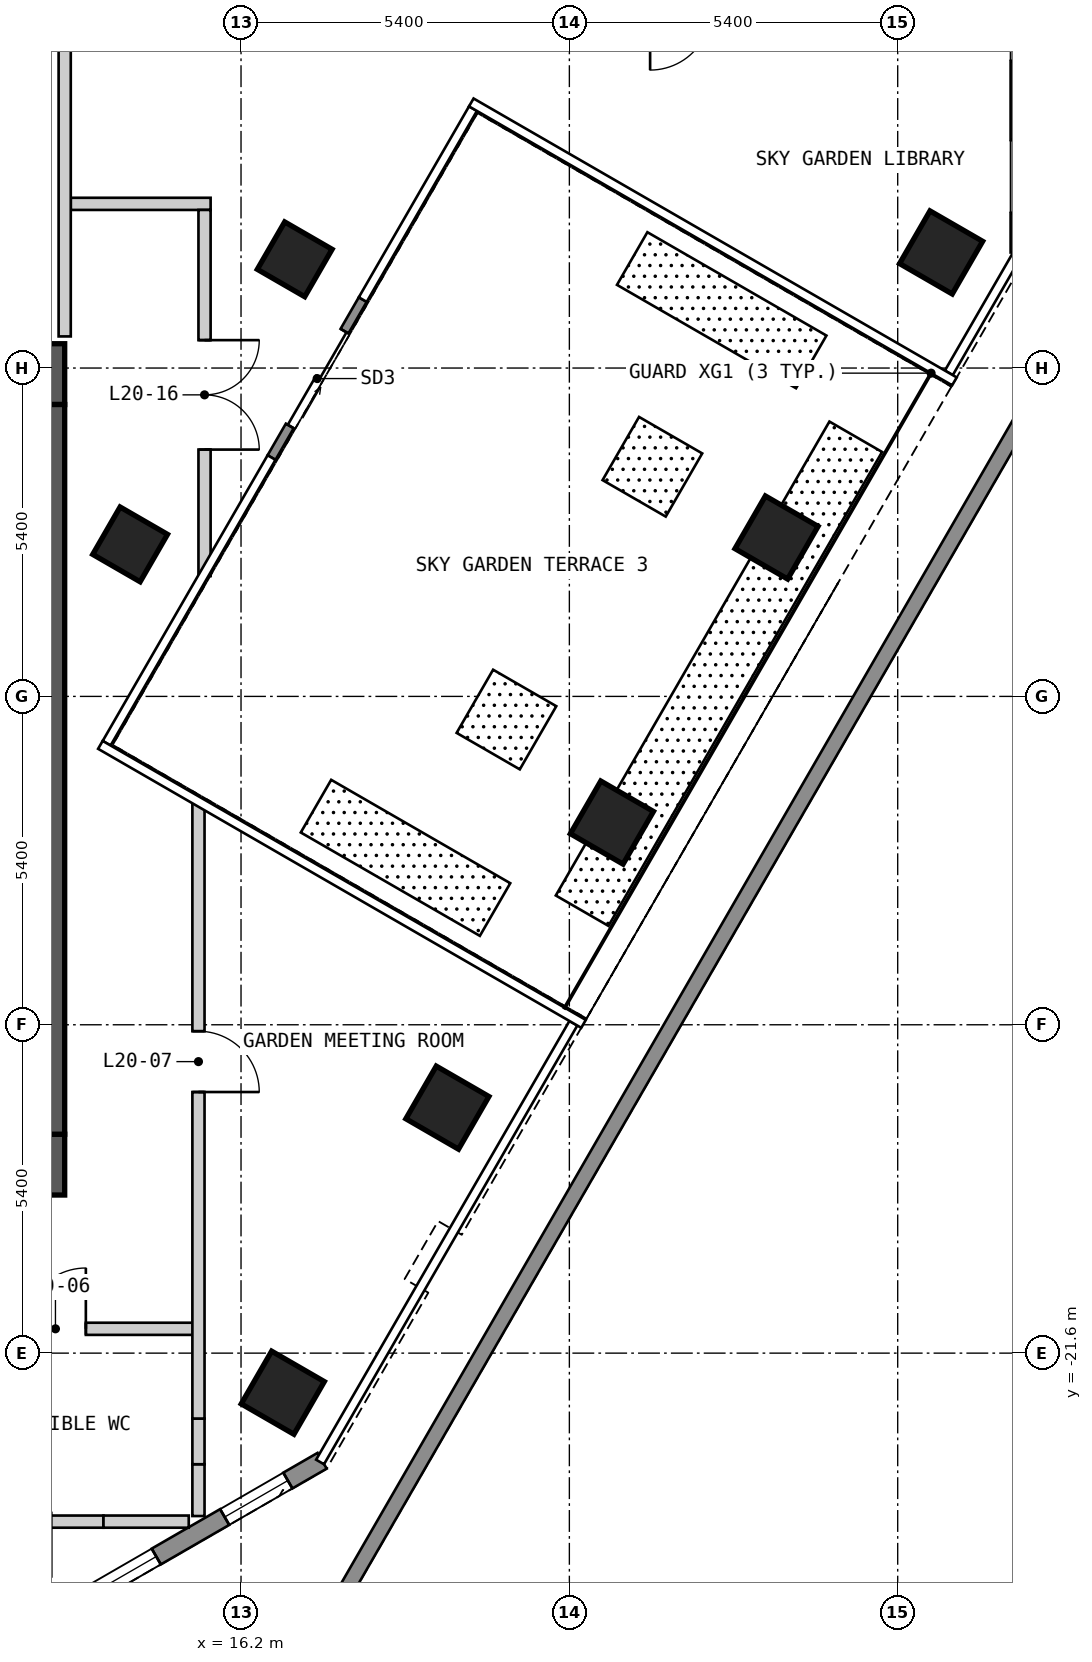
"""IFC4 building model, lengths in metres.
Left out: names, types, materials, properties, quantities, classifications, styles, units other than length and angle.
Written with IfcOpenShell. Run it as: python <this file> out.ifc"""

import sys

from ifc_helpers import new_model, si_unit, direction, frame, frame_2d, origin, origin_2d, place, context, subcontext, project, spatial, polyline, rectangle, outline, extrude, element, fill, save


model = new_model("IFC4")
c1 = context("Model", 3, precision=1e-05, world=origin(), true_north=direction((0.0, 1.0)))
c2 = subcontext(c1, "Body", "Model", "MODEL_VIEW")
j1 = project(units=[si_unit("LENGTHUNIT", "METRE"), si_unit("PLANEANGLEUNIT", "RADIAN")], contexts=[c1])
p1 = place(None, origin())
s1 = spatial("IfcSite", under=j1, at=p1, CompositionType="ELEMENT")
p2 = place(p1, origin())
s2 = spatial("IfcBuilding", under=s1, at=p2, CompositionType="ELEMENT")
p3 = place(p2, frame((0.0, 0.0, 66.0)))
s3 = spatial("IfcBuildingStorey", under=s2, at=p3, CompositionType="ELEMENT", Elevation=66.0)
for number, where, z_axis, x_axis in (
    (1, (16.887, -22.251, 0.0), (0.0, 0.0, 1.0), (0.5, 0.866, 0.0)),
    (2, (19.594, -17.563, 0.0), (0.0, 0.0, 1.0), (0.5, 0.866, 0.0)),
    (3, (22.3, -12.875, 0.0), (0.0, 0.0, 1.0), (0.5, 0.866, 0.0)),
    (4, (25.007, -8.187, 0.0), (0.0, 0.0, 1.0), (0.5, 0.866, 0.0)),
    (5, (27.714, -3.499, 0.0), (0.0, 0.0, 1.0), (0.5, 0.866, 0.0)),
):
    element("IfcColumn", number, at=place(p3, frame(where, z_axis=z_axis, x_axis=x_axis)), inside=s3, PredefinedType="COLUMN", context=c2, shape_type="SweptSolid", body=[
        extrude(rectangle(XDim=1.0, YDim=1.0, at=origin_2d()), origin(), (0.0, 0.0, 1.0), 6.0),
    ])
for number, where, z_axis, x_axis in (
    (6, (14.376, -8.3, 0.0), (0.0, 0.0, 1.0), (0.5, 0.866, 0.0)),
    (7, (17.083, -3.612, 0.0), (0.0, 0.0, 1.0), (0.5, 0.866, 0.0)),
):
    element("IfcColumn", number, at=place(p3, frame(where, z_axis=z_axis, x_axis=x_axis)), inside=s3, PredefinedType="COLUMN", context=c2, shape_type="SweptSolid", body=[
        extrude(rectangle(XDim=0.9, YDim=0.9, at=origin_2d()), origin(), (0.0, 0.0, 1.0), 6.0),
    ])
p4 = place(p3, frame((-13.3, -18.5, 0.0), z_axis=(0.0, 0.0, 1.0), x_axis=(1.0, 0.0, 0.0)))
e8 = element("IfcWall", 8, at=p4, inside=s3, PredefinedType="SHEAR", context=c2, shape_type="SweptSolid", body=[
    extrude(rectangle(XDim=26.6, YDim=1.0, at=frame_2d((13.3, 0.0))), origin(), (0.0, 0.0, 1.0), 5.7),
])
p5 = place(p3, frame((-13.3, -5.5, 0.0), z_axis=(0.0, 0.0, 1.0), x_axis=(1.0, 0.0, 0.0)))
e9 = element("IfcWall", 9, at=p5, inside=s3, PredefinedType="SHEAR", context=c2, shape_type="SweptSolid", body=[
    extrude(rectangle(XDim=26.6, YDim=1.0, at=frame_2d((13.3, 0.0))), origin(), (0.0, 0.0, 1.0), 5.7),
])
p6 = place(p5, frame((23.65, 0.0, 0.0)))
e10 = element("IfcOpeningElement", 10, at=p6, cuts=e9, PredefinedType="OPENING", context=c2, shape_type="SweptSolid", body=[
    extrude(rectangle(XDim=1.2, YDim=2.1, at=frame_2d((0.6, 1.05))), frame((0.0, 0.51, 0.0), z_axis=(0.0, -1.0, 0.0), x_axis=(1.0, 0.0, 0.0)), (0.0, 0.0, 1.0), 1.02),
])
p7 = place(p3, frame((12.8, -18.0, 0.0), z_axis=(0.0, 0.0, 1.0), x_axis=(0.0, 1.0, 0.0)))
e11 = element("IfcWall", 11, at=p7, inside=s3, PredefinedType="SHEAR", context=c2, shape_type="SweptSolid", body=[
    extrude(rectangle(XDim=12.0, YDim=1.0, at=frame_2d((6.0, 0.0))), origin(), (0.0, 0.0, 1.0), 5.7),
])
p8 = place(p3, frame((13.204, -25.87, 0.0), z_axis=(0.0, 0.0, 1.0), x_axis=(0.866010750942, 0.50002537861, 0.0)))
e12 = element("IfcWall", 12, at=p8, inside=s3, PredefinedType="SOLIDWALL", context=c2, shape_type="SweptSolid", body=[
    extrude(outline(polyline([(0.0, -0.15), (5.0, -0.15), (4.919, 0.15), (0.08, 0.15), (0.0, -0.15)])), origin(), (0.0, 0.0, 1.0), 5.7),
])
p9 = place(p8, frame((0.65, 0.0, 0.15)))
e13 = element("IfcOpeningElement", 13, at=p9, cuts=e12, PredefinedType="OPENING", context=c2, shape_type="SweptSolid", body=[
    extrude(rectangle(XDim=1.2, YDim=2.1, at=frame_2d((0.6, 1.05))), frame((0.0, 0.16, 0.0), z_axis=(0.0, -1.0, 0.0), x_axis=(1.0, 0.0, 0.0)), (0.0, 0.0, 1.0), 0.32),
])
p10 = place(p8, frame((3.149, 0.0, 0.15)))
e14 = element("IfcOpeningElement", 14, at=p10, cuts=e12, PredefinedType="OPENING", context=c2, shape_type="SweptSolid", body=[
    extrude(rectangle(XDim=1.2, YDim=2.1, at=frame_2d((0.6, 1.05))), frame((0.0, 0.16, 0.0), z_axis=(0.0, -1.0, 0.0), x_axis=(1.0, 0.0, 0.0)), (0.0, 0.0, 1.0), 0.32),
])
p11 = place(p3, frame((29.007, -3.5, 0.0), z_axis=(0.0, 0.0, 1.0), x_axis=(0.0, 1.0, 0.0)))
e15 = element("IfcWall", 15, at=p11, inside=s3, PredefinedType="SOLIDWALL", context=c2, shape_type="SweptSolid", body=[
    extrude(outline(polyline([(0.0, -0.15), (5.0, -0.15), (4.92, 0.15), (0.08, 0.15), (0.0, -0.15)])), origin(), (0.0, 0.0, 1.0), 5.7),
])
p12 = place(p11, frame((0.65, 0.0, 0.15)))
e16 = element("IfcOpeningElement", 16, at=p12, cuts=e15, PredefinedType="OPENING", context=c2, shape_type="SweptSolid", body=[
    extrude(rectangle(XDim=1.2, YDim=2.1, at=frame_2d((0.6, 1.05))), frame((0.0, 0.16, 0.0), z_axis=(0.0, -1.0, 0.0), x_axis=(1.0, 0.0, 0.0)), (0.0, 0.0, 1.0), 0.32),
])
p13 = place(p11, frame((3.15, 0.0, 0.15)))
e17 = element("IfcOpeningElement", 17, at=p13, cuts=e15, PredefinedType="OPENING", context=c2, shape_type="SweptSolid", body=[
    extrude(rectangle(XDim=1.2, YDim=2.1, at=frame_2d((0.6, 1.05))), frame((0.0, 0.16, 0.0), z_axis=(0.0, -1.0, 0.0), x_axis=(1.0, 0.0, 0.0)), (0.0, 0.0, 1.0), 0.32),
])
p14 = place(p3, frame((16.702, -6.872, 0.0), z_axis=(0.0, 0.0, 1.0), x_axis=(0.499990139034, 0.866031096941, 0.0)))
e18 = element("IfcWall", 18, at=p14, inside=s3, PredefinedType="SOLIDWALL", context=c2, shape_type="SweptSolid", body=[
    extrude(rectangle(XDim=3.0, YDim=0.15, at=frame_2d((1.5, 0.0))), origin(), (0.0, 0.0, 1.0), 5.7),
])
p15 = place(p14, frame((0.6, 0.0, 0.0)))
e19 = element("IfcOpeningElement", 19, at=p15, cuts=e18, PredefinedType="OPENING", context=c2, shape_type="SweptSolid", body=[
    extrude(rectangle(XDim=1.8, YDim=2.4, at=frame_2d((0.9, 1.2))), frame((0.0, 0.085, 0.0), z_axis=(0.0, -1.0, 0.0), x_axis=(1.0, 0.0, 0.0)), (0.0, 0.0, 1.0), 0.17),
])
p16 = place(p3, frame((31.242, -2.438, 0.0), z_axis=(0.0, 0.0, 1.0), x_axis=(-0.500044695558, -0.865999597254, 0.0)))
e20 = element("IfcWall", 20, at=p16, inside=s3, PredefinedType="PARAPET", context=c2, shape_type="SweptSolid", body=[
    extrude(outline(polyline([(0.067, -0.125), (26.953, -0.125), (27.02, 0.125), (0.0, 0.125), (0.067, -0.125)])), origin(), (0.0, 0.0, 1.0), 1.6),
])
p17 = place(p3, frame((12.491, -24.371, 0.0), z_axis=(0.0, 0.0, 1.0), x_axis=(1.0, 0.0, 0.0)))
e21 = element("IfcWall", 21, at=p17, inside=s3, PredefinedType="PARTITIONING", context=c2, shape_type="SweptSolid", body=[
    extrude(rectangle(XDim=1.447, YDim=0.2, at=frame_2d((0.724, 0.0))), origin(), (0.0, 0.0, 1.0), 5.02),
])
p18 = place(p3, frame((13.938, -24.371, 0.0), z_axis=(0.0, 0.0, 1.0), x_axis=(1.0, 0.0, 0.0)))
e22 = element("IfcWall", 22, at=p18, inside=s3, PredefinedType="PARTITIONING", context=c2, shape_type="SweptSolid", body=[
    extrude(rectangle(XDim=1.402, YDim=0.2, at=frame_2d((0.701, 0.0))), origin(), (0.0, 0.0, 1.0), 5.7),
])
p19 = place(p3, frame((-16.2, -21.2, 0.0), z_axis=(0.0, 0.0, 1.0), x_axis=(1.0, 0.0, 0.0)))
e23 = element("IfcWall", 23, at=p19, inside=s3, PredefinedType="PARTITIONING", context=c2, shape_type="SweptSolid", body=[
    extrude(rectangle(XDim=31.7, YDim=0.2, at=frame_2d((15.85, 0.0))), origin(), (0.0, 0.0, 1.0), 5.7),
])
p20 = place(p19, frame((3.151, 0.0, 0.0), z_axis=(0.0, 0.0, 1.0), x_axis=(-1.0, 0.0, 0.0)))
e24 = element("IfcOpeningElement", 24, at=p20, cuts=e23, PredefinedType="OPENING", context=c2, shape_type="SweptSolid", body=[
    extrude(rectangle(XDim=0.9, YDim=2.1, at=frame_2d((0.45, 1.05))), frame((0.0, 0.11, 0.0), z_axis=(0.0, -1.0, 0.0), x_axis=(1.0, 0.0, 0.0)), (0.0, 0.0, 1.0), 0.22),
])
p21 = place(p19, frame((16.7, 0.0, 0.0), z_axis=(0.0, 0.0, 1.0), x_axis=(-1.0, 0.0, 0.0)))
e25 = element("IfcOpeningElement", 25, at=p21, cuts=e23, PredefinedType="OPENING", context=c2, shape_type="SweptSolid", body=[
    extrude(rectangle(XDim=1.0, YDim=2.1, at=frame_2d((0.5, 1.05))), frame((0.0, 0.11, 0.0), z_axis=(0.0, -1.0, 0.0), x_axis=(1.0, 0.0, 0.0)), (0.0, 0.0, 1.0), 0.22),
])
p22 = place(p19, frame((29.848, 0.0, 0.0), z_axis=(0.0, 0.0, 1.0), x_axis=(-1.0, 0.0, 0.0)))
e26 = element("IfcOpeningElement", 26, at=p22, cuts=e23, PredefinedType="OPENING", context=c2, shape_type="SweptSolid", body=[
    extrude(rectangle(XDim=1.0, YDim=2.1, at=frame_2d((0.5, 1.05))), frame((0.0, 0.11, 0.0), z_axis=(0.0, -1.0, 0.0), x_axis=(1.0, 0.0, 0.0)), (0.0, 0.0, 1.0), 0.22),
])
p23 = place(p3, frame((13.4, -2.7, 0.0), z_axis=(0.0, 0.0, 1.0), x_axis=(1.0, 0.0, 0.0)))
e27 = element("IfcWall", 27, at=p23, inside=s3, PredefinedType="PARTITIONING", context=c2, shape_type="SweptSolid", body=[
    extrude(rectangle(XDim=2.3, YDim=0.2, at=frame_2d((1.15, 0.0))), origin(), (0.0, 0.0, 1.0), 5.7),
])
p24 = place(p3, frame((13.3, -4.88, 0.0), z_axis=(0.0, 0.0, 1.0), x_axis=(0.0, 1.0, 0.0)))
e28 = element("IfcWall", 28, at=p24, inside=s3, PredefinedType="PARTITIONING", context=c2, shape_type="SweptSolid", body=[
    extrude(rectangle(XDim=6.78, YDim=0.2, at=frame_2d((3.39, 0.0))), origin(), (0.0, 0.0, 1.0), 5.7),
])
p25 = place(p3, frame((15.5, -24.279, 0.0), z_axis=(0.0, 0.0, 1.0), x_axis=(0.0, 1.0, 0.0)))
e29 = element("IfcWall", 29, at=p25, inside=s3, PredefinedType="PARTITIONING", context=c2, shape_type="SweptSolid", body=[
    extrude(rectangle(XDim=0.852, YDim=0.2, at=frame_2d((0.426, 0.0))), origin(), (0.0, 0.0, 1.0), 5.7),
])
p26 = place(p3, frame((15.5, -23.427, 0.0), z_axis=(0.0, 0.0, 1.0), x_axis=(0.0, 1.0, 0.0)))
e30 = element("IfcWall", 30, at=p26, inside=s3, PredefinedType="PARTITIONING", context=c2, shape_type="SweptSolid", body=[
    extrude(rectangle(XDim=0.751, YDim=0.2, at=frame_2d((0.375, 0.0))), origin(), (0.0, 0.0, 1.0), 5.02),
])
p27 = place(p3, frame((15.5, -22.676, 0.0), z_axis=(0.0, 0.0, 1.0), x_axis=(0.0, 1.0, 0.0)))
e31 = element("IfcWall", 31, at=p27, inside=s3, PredefinedType="PARTITIONING", context=c2, shape_type="SweptSolid", body=[
    extrude(rectangle(XDim=10.171, YDim=0.2, at=frame_2d((5.085, 0.0))), origin(), (0.0, 0.0, 1.0), 5.7),
])
p28 = place(p27, frame((6.37, 0.0, 0.0), z_axis=(0.0, 0.0, 1.0), x_axis=(-1.0, 0.0, 0.0)))
e32 = element("IfcOpeningElement", 32, at=p28, cuts=e31, PredefinedType="OPENING", context=c2, shape_type="SweptSolid", body=[
    extrude(rectangle(XDim=1.0, YDim=2.1, at=frame_2d((0.5, 1.05))), frame((0.0, 0.11, 0.0), z_axis=(0.0, -1.0, 0.0), x_axis=(1.0, 0.0, 0.0)), (0.0, 0.0, 1.0), 0.22),
])
p29 = place(p3, frame((15.6, -8.821, 0.0), z_axis=(0.0, 0.0, 1.0), x_axis=(0.0, 1.0, 0.0)))
e33 = element("IfcWall", 33, at=p29, inside=s3, PredefinedType="PARTITIONING", context=c2, shape_type="SweptSolid", body=[
    extrude(rectangle(XDim=6.021, YDim=0.2, at=frame_2d((3.01, 0.0))), origin(), (0.0, 0.0, 1.0), 5.7),
])
p30 = place(p29, frame((3.88, 0.0, 0.0), z_axis=(0.0, 0.0, 1.0), x_axis=(-1.0, 0.0, 0.0)))
e34 = element("IfcOpeningElement", 34, at=p30, cuts=e33, PredefinedType="OPENING", context=c2, shape_type="SweptSolid", body=[
    extrude(rectangle(XDim=1.8, YDim=2.1, at=frame_2d((0.9, 1.05))), frame((0.0, 0.11, 0.0), z_axis=(0.0, -1.0, 0.0), x_axis=(1.0, 0.0, 0.0)), (0.0, 0.0, 1.0), 0.22),
])
p31 = place(p9, origin())
e35 = element("IfcWindow", 35, at=p31, inside=s3, PartitioningType="SINGLE_PANEL", PredefinedType="WINDOW", context=c2, shape_type="SweptSolid", body=[
    extrude(rectangle(XDim=1.2, YDim=2.1, at=frame_2d((0.6, 1.05))), frame((0.0, 0.03, 0.0), z_axis=(0.0, -1.0, 0.0), x_axis=(1.0, 0.0, 0.0)), (0.0, 0.0, 1.0), 0.06),
])
fill(e13, e35)
p32 = place(p10, origin())
e36 = element("IfcWindow", 36, at=p32, inside=s3, PartitioningType="SINGLE_PANEL", PredefinedType="WINDOW", context=c2, shape_type="SweptSolid", body=[
    extrude(rectangle(XDim=1.2, YDim=2.1, at=frame_2d((0.6, 1.05))), frame((0.0, 0.03, 0.0), z_axis=(0.0, -1.0, 0.0), x_axis=(1.0, 0.0, 0.0)), (0.0, 0.0, 1.0), 0.06),
])
fill(e14, e36)
p33 = place(p15, origin())
e37 = element("IfcDoor", 37, at=p33, inside=s3, OperationType="SLIDING_TO_LEFT", PredefinedType="DOOR", context=c2, shape_type="SweptSolid", body=[
    extrude(rectangle(XDim=1.8, YDim=2.4, at=frame_2d((0.9, 1.2))), frame((0.0, 0.025, 0.0), z_axis=(0.0, -1.0, 0.0), x_axis=(1.0, 0.0, 0.0)), (0.0, 0.0, 1.0), 0.05),
])
fill(e19, e37)
p34 = place(p22, origin())
e38 = element("IfcDoor", 38, at=p34, inside=s3, OperationType="SINGLE_SWING_LEFT", PredefinedType="DOOR", context=c2, shape_type="SweptSolid", body=[
    extrude(rectangle(XDim=1.0, YDim=2.1, at=frame_2d((0.5, 1.05))), frame((0.0, 0.025, 0.0), z_axis=(0.0, -1.0, 0.0), x_axis=(1.0, 0.0, 0.0)), (0.0, 0.0, 1.0), 0.05),
])
fill(e26, e38)
p35 = place(p28, origin())
e39 = element("IfcDoor", 39, at=p35, inside=s3, OperationType="SINGLE_SWING_RIGHT", PredefinedType="DOOR", context=c2, shape_type="SweptSolid", body=[
    extrude(rectangle(XDim=1.0, YDim=2.1, at=frame_2d((0.5, 1.05))), frame((0.0, 0.025, 0.0), z_axis=(0.0, -1.0, 0.0), x_axis=(1.0, 0.0, 0.0)), (0.0, 0.0, 1.0), 0.05),
])
fill(e32, e39)
p36 = place(p30, origin())
e40 = element("IfcDoor", 40, at=p36, inside=s3, OperationType="DOUBLE_DOOR_SINGLE_SWING", PredefinedType="DOOR", context=c2, shape_type="SweptSolid", body=[
    extrude(rectangle(XDim=1.8, YDim=2.1, at=frame_2d((0.9, 1.05))), frame((0.0, 0.025, 0.0), z_axis=(0.0, -1.0, 0.0), x_axis=(1.0, 0.0, 0.0)), (0.0, 0.0, 1.0), 0.05),
])
fill(e34, e40)
save(model, sys.argv[1])
